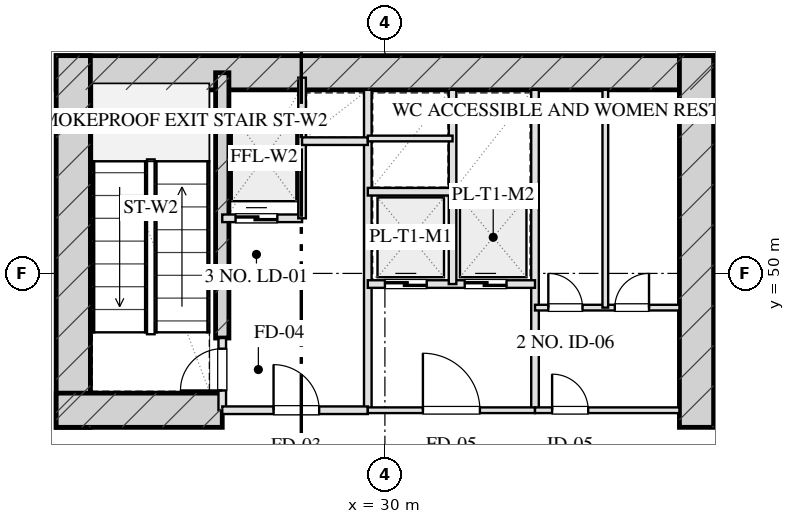
"""IFC4 building model, lengths in metres.
Left out: names, types, materials, properties, quantities, classifications, styles, units other than length and angle.
Written with IfcOpenShell. Run it as: python <this file> out.ifc"""

import sys

from ifc_helpers import new_model, si_unit, direction, frame, frame_2d, origin, place, context, subcontext, project, spatial, rectangle, extrude, element, fill, save


model = new_model("IFC4")
c1 = context("Model", 3, precision=1e-05, world=origin(), true_north=direction((0.0, 1.0)))
c2 = subcontext(c1, "Body", "Model", "MODEL_VIEW")
j1 = project(units=[si_unit("LENGTHUNIT", "METRE"), si_unit("PLANEANGLEUNIT", "RADIAN")], contexts=[c1])
p1 = place(None, origin())
s1 = spatial("IfcSite", under=j1, at=p1, CompositionType="ELEMENT")
p2 = place(p1, origin())
s2 = spatial("IfcBuilding", under=s1, at=p2, CompositionType="ELEMENT")
p3 = place(p2, frame((0.0, 0.0, 6.0)))
s3 = spatial("IfcBuildingStorey", under=s2, at=p3, CompositionType="ELEMENT", Elevation=6.0)
p4 = place(p3, frame((21.35, 55.28, 0.0), z_axis=(0.0, 0.0, 1.0), x_axis=(1.0, 0.0, 0.0)))
e1 = element("IfcWall", 1, at=p4, inside=s3, PredefinedType="SHEAR", context=c2, shape_type="SweptSolid", body=[
    extrude(rectangle(XDim=17.3, YDim=0.9, at=frame_2d((8.65, 0.0))), origin(), (0.0, 0.0, 1.0), 5.5),
])
for number, where, z_axis, x_axis in (
    (2, (21.8, 45.95, 0.0), (0.0, 0.0, 1.0), (0.0, 1.0, 0.0)),
    (3, (38.2, 45.95, 0.0), (0.0, 0.0, 1.0), (0.0, 1.0, 0.0)),
):
    element("IfcWall", number, at=place(p3, frame(where, z_axis=z_axis, x_axis=x_axis)), inside=s3, PredefinedType="SHEAR", context=c2, shape_type="SweptSolid", body=[
        extrude(rectangle(XDim=9.78, YDim=0.9, at=frame_2d((4.89, 0.0))), origin(), (0.0, 0.0, 1.0), 5.5),
    ])
p5 = place(p3, frame((25.72, 48.3, 0.0), z_axis=(0.0, 0.0, 1.0), x_axis=(0.0, 1.0, 0.0)))
e4 = element("IfcWall", 4, at=p5, inside=s3, PredefinedType="SHEAR", context=c2, shape_type="SweptSolid", body=[
    extrude(rectangle(XDim=6.98, YDim=0.35, at=frame_2d((3.49, 0.0))), origin(), (0.0, 0.0, 1.0), 5.5),
])
p6 = place(p3, frame((21.35, 46.4, 0.0), z_axis=(0.0, 0.0, 1.0), x_axis=(1.0, 0.0, 0.0)))
e5 = element("IfcWall", 5, at=p6, inside=s3, PredefinedType="SHEAR", context=c2, shape_type="SweptSolid", body=[
    extrude(rectangle(XDim=4.37, YDim=0.9, at=frame_2d((2.185, 0.0))), origin(), (0.0, 0.0, 1.0), 5.5),
])
p7 = place(p3, frame((25.72, 46.4, 0.0), z_axis=(0.0, 0.0, 1.0), x_axis=(0.0, 1.0, 0.0)))
e6 = element("IfcWall", 6, at=p7, inside=s3, PredefinedType="PARTITIONING", context=c2, shape_type="SweptSolid", body=[
    extrude(rectangle(XDim=1.9, YDim=0.2, at=frame_2d((0.95, 0.0))), origin(), (0.0, 0.0, 1.0), 5.185),
])
p8 = place(p7, frame((0.52, 0.0, 0.0)))
e7 = element("IfcOpeningElement", 7, at=p8, cuts=e6, PredefinedType="OPENING", context=c2, shape_type="SweptSolid", body=[
    extrude(rectangle(XDim=1.1, YDim=2.05, at=frame_2d((0.55, 1.025))), frame((0.0, 0.11, 0.0), z_axis=(0.0, -1.0, 0.0), x_axis=(1.0, 0.0, 0.0)), (0.0, 0.0, 1.0), 0.22),
])
p9 = place(p3, frame((29.55, 46.4, 0.0), z_axis=(0.0, 0.0, 1.0), x_axis=(0.0, 1.0, 0.0)))
e8 = element("IfcWall", 8, at=p9, inside=s3, PredefinedType="PARTITIONING", context=c2, shape_type="SweptSolid", body=[
    extrude(rectangle(XDim=8.43, YDim=0.2, at=frame_2d((4.215, 0.0))), origin(), (0.0, 0.0, 1.0), 5.185),
])
p10 = place(p3, frame((25.72, 46.4, 0.0), z_axis=(0.0, 0.0, 1.0), x_axis=(1.0, 0.0, 0.0)))
e9 = element("IfcWall", 9, at=p10, inside=s3, PredefinedType="PARTITIONING", context=c2, shape_type="SweptSolid", body=[
    extrude(rectangle(XDim=3.83, YDim=0.2, at=frame_2d((1.915, 0.0))), origin(), (0.0, 0.0, 1.0), 5.185),
])
p11 = place(p10, frame((1.35, 0.0, 0.0)))
e10 = element("IfcOpeningElement", 10, at=p11, cuts=e9, PredefinedType="OPENING", context=c2, shape_type="SweptSolid", body=[
    extrude(rectangle(XDim=1.2, YDim=2.05, at=frame_2d((0.6, 1.025))), frame((0.0, 0.11, 0.0), z_axis=(0.0, -1.0, 0.0), x_axis=(1.0, 0.0, 0.0)), (0.0, 0.0, 1.0), 0.22),
])
p12 = place(p3, frame((25.72, 51.45, 0.0), z_axis=(0.0, 0.0, 1.0), x_axis=(1.0, 0.0, 0.0)))
e11 = element("IfcWall", 11, at=p12, inside=s3, PredefinedType="PARTITIONING", context=c2, shape_type="SweptSolid", body=[
    extrude(rectangle(XDim=2.1, YDim=0.2, at=frame_2d((1.05, 0.0))), origin(), (0.0, 0.0, 1.0), 5.185),
])
p13 = place(p12, frame((0.35, 0.0, 0.0)))
e12 = element("IfcOpeningElement", 12, at=p13, cuts=e11, PredefinedType="OPENING", context=c2, shape_type="SweptSolid", body=[
    extrude(rectangle(XDim=1.1, YDim=2.05, at=frame_2d((0.55, 1.025))), frame((0.0, 0.11, 0.0), z_axis=(0.0, -1.0, 0.0), x_axis=(1.0, 0.0, 0.0)), (0.0, 0.0, 1.0), 0.22),
])
p14 = place(p3, frame((27.82, 51.45, 0.0), z_axis=(0.0, 0.0, 1.0), x_axis=(0.0, 1.0, 0.0)))
e13 = element("IfcWall", 13, at=p14, inside=s3, PredefinedType="PARTITIONING", context=c2, shape_type="SweptSolid", body=[
    extrude(rectangle(XDim=3.7, YDim=0.2, at=frame_2d((1.85, 0.0))), origin(), (0.0, 0.0, 1.0), 5.185),
])
p15 = place(p3, frame((27.82, 53.48, 0.0), z_axis=(0.0, 0.0, 1.0), x_axis=(1.0, 0.0, 0.0)))
e14 = element("IfcWall", 14, at=p15, inside=s3, PredefinedType="PARTITIONING", context=c2, shape_type="SweptSolid", body=[
    extrude(rectangle(XDim=1.73, YDim=0.2, at=frame_2d((0.865, 0.0))), origin(), (0.0, 0.0, 1.0), 5.185),
])
p16 = place(p3, frame((33.95, 46.4, 0.0), z_axis=(0.0, 0.0, 1.0), x_axis=(0.0, 1.0, 0.0)))
e15 = element("IfcWall", 15, at=p16, inside=s3, PredefinedType="PARTITIONING", context=c2, shape_type="SweptSolid", body=[
    extrude(rectangle(XDim=8.43, YDim=0.2, at=frame_2d((4.215, 0.0))), origin(), (0.0, 0.0, 1.0), 5.185),
])
p17 = place(p3, frame((29.55, 46.4, 0.0), z_axis=(0.0, 0.0, 1.0), x_axis=(1.0, 0.0, 0.0)))
e16 = element("IfcWall", 16, at=p17, inside=s3, PredefinedType="PARTITIONING", context=c2, shape_type="SweptSolid", body=[
    extrude(rectangle(XDim=4.4, YDim=0.15, at=frame_2d((2.2, 0.0))), origin(), (0.0, 0.0, 1.0), 5.185),
])
p18 = place(p17, frame((1.45, 0.0, 0.0)))
e17 = element("IfcOpeningElement", 17, at=p18, cuts=e16, PredefinedType="OPENING", context=c2, shape_type="SweptSolid", body=[
    extrude(rectangle(XDim=1.5, YDim=2.05, at=frame_2d((0.75, 1.025))), frame((0.0, 0.085, 0.0), z_axis=(0.0, -1.0, 0.0), x_axis=(1.0, 0.0, 0.0)), (0.0, 0.0, 1.0), 0.17),
])
p19 = place(p3, frame((29.55, 49.72, 0.0), z_axis=(0.0, 0.0, 1.0), x_axis=(1.0, 0.0, 0.0)))
e18 = element("IfcWall", 18, at=p19, inside=s3, PredefinedType="PARTITIONING", context=c2, shape_type="SweptSolid", body=[
    extrude(rectangle(XDim=4.4, YDim=0.2, at=frame_2d((2.2, 0.0))), origin(), (0.0, 0.0, 1.0), 5.185),
])
p20 = place(p19, frame((0.45, 0.0, 0.0)))
e19 = element("IfcOpeningElement", 19, at=p20, cuts=e18, PredefinedType="OPENING", context=c2, shape_type="SweptSolid", body=[
    extrude(rectangle(XDim=1.1, YDim=2.05, at=frame_2d((0.55, 1.025))), frame((0.0, 0.11, 0.0), z_axis=(0.0, -1.0, 0.0), x_axis=(1.0, 0.0, 0.0)), (0.0, 0.0, 1.0), 0.22),
])
p21 = place(p19, frame((2.55, 0.0, 0.0)))
e20 = element("IfcOpeningElement", 20, at=p21, cuts=e18, PredefinedType="OPENING", context=c2, shape_type="SweptSolid", body=[
    extrude(rectangle(XDim=1.1, YDim=2.05, at=frame_2d((0.55, 1.025))), frame((0.0, 0.11, 0.0), z_axis=(0.0, -1.0, 0.0), x_axis=(1.0, 0.0, 0.0)), (0.0, 0.0, 1.0), 0.22),
])
p22 = place(p3, frame((31.78, 49.72, 0.0), z_axis=(0.0, 0.0, 1.0), x_axis=(0.0, 1.0, 0.0)))
e21 = element("IfcWall", 21, at=p22, inside=s3, PredefinedType="PARTITIONING", context=c2, shape_type="SweptSolid", body=[
    extrude(rectangle(XDim=5.11, YDim=0.2, at=frame_2d((2.555, 0.0))), origin(), (0.0, 0.0, 1.0), 5.185),
])
p23 = place(p3, frame((29.55, 52.15, 0.0), z_axis=(0.0, 0.0, 1.0), x_axis=(1.0, 0.0, 0.0)))
e22 = element("IfcWall", 22, at=p23, inside=s3, PredefinedType="PARTITIONING", context=c2, shape_type="SweptSolid", body=[
    extrude(rectangle(XDim=4.4, YDim=0.2, at=frame_2d((2.2, 0.0))), origin(), (0.0, 0.0, 1.0), 5.185),
])
p24 = place(p3, frame((29.55, 53.55, 0.0), z_axis=(0.0, 0.0, 1.0), x_axis=(1.0, 0.0, 0.0)))
e23 = element("IfcWall", 23, at=p24, inside=s3, PredefinedType="PARTITIONING", context=c2, shape_type="SweptSolid", body=[
    extrude(rectangle(XDim=2.23, YDim=0.15, at=frame_2d((1.115, 0.0))), origin(), (0.0, 0.0, 1.0), 5.185),
])
p25 = place(p3, frame((33.95, 46.4, 0.0), z_axis=(0.0, 0.0, 1.0), x_axis=(1.0, 0.0, 0.0)))
e24 = element("IfcWall", 24, at=p25, inside=s3, PredefinedType="PARTITIONING", context=c2, shape_type="SweptSolid", body=[
    extrude(rectangle(XDim=3.8, YDim=0.15, at=frame_2d((1.9, 0.0))), origin(), (0.0, 0.0, 1.0), 5.185),
])
p26 = place(p25, frame((0.45, 0.0, 0.0)))
e25 = element("IfcOpeningElement", 25, at=p26, cuts=e24, PredefinedType="OPENING", context=c2, shape_type="SweptSolid", body=[
    extrude(rectangle(XDim=0.95, YDim=2.05, at=frame_2d((0.475, 1.025))), frame((0.0, 0.085, 0.0), z_axis=(0.0, -1.0, 0.0), x_axis=(1.0, 0.0, 0.0)), (0.0, 0.0, 1.0), 0.17),
])
p27 = place(p3, frame((33.95, 49.1, 0.0), z_axis=(0.0, 0.0, 1.0), x_axis=(1.0, 0.0, 0.0)))
e26 = element("IfcWall", 26, at=p27, inside=s3, PredefinedType="PARTITIONING", context=c2, shape_type="SweptSolid", body=[
    extrude(rectangle(XDim=3.8, YDim=0.15, at=frame_2d((1.9, 0.0))), origin(), (0.0, 0.0, 1.0), 5.185),
])
p28 = place(p27, frame((0.35, 0.0, 0.0)))
e27 = element("IfcOpeningElement", 27, at=p28, cuts=e26, PredefinedType="OPENING", context=c2, shape_type="SweptSolid", body=[
    extrude(rectangle(XDim=0.9, YDim=2.05, at=frame_2d((0.45, 1.025))), frame((0.0, 0.085, 0.0), z_axis=(0.0, -1.0, 0.0), x_axis=(1.0, 0.0, 0.0)), (0.0, 0.0, 1.0), 0.17),
])
p29 = place(p27, frame((2.1, 0.0, 0.0)))
e28 = element("IfcOpeningElement", 28, at=p29, cuts=e26, PredefinedType="OPENING", context=c2, shape_type="SweptSolid", body=[
    extrude(rectangle(XDim=0.9, YDim=2.05, at=frame_2d((0.45, 1.025))), frame((0.0, 0.085, 0.0), z_axis=(0.0, -1.0, 0.0), x_axis=(1.0, 0.0, 0.0)), (0.0, 0.0, 1.0), 0.17),
])
p30 = place(p3, frame((35.8, 49.1, 0.0), z_axis=(0.0, 0.0, 1.0), x_axis=(0.0, 1.0, 0.0)))
e29 = element("IfcWall", 29, at=p30, inside=s3, PredefinedType="PARTITIONING", context=c2, shape_type="SweptSolid", body=[
    extrude(rectangle(XDim=5.73, YDim=0.15, at=frame_2d((2.865, 0.0))), origin(), (0.0, 0.0, 1.0), 5.185),
])
p31 = place(p8, origin())
e30 = element("IfcDoor", 30, at=p31, inside=s3, OperationType="SINGLE_SWING_LEFT", PredefinedType="DOOR", context=c2, shape_type="SweptSolid", body=[
    extrude(rectangle(XDim=1.1, YDim=2.05, at=frame_2d((0.55, 1.025))), frame((0.0, 0.025, 0.0), z_axis=(0.0, -1.0, 0.0), x_axis=(1.0, 0.0, 0.0)), (0.0, 0.0, 1.0), 0.05),
])
fill(e7, e30)
p32 = place(p11, origin())
e31 = element("IfcDoor", 31, at=p32, inside=s3, OperationType="SINGLE_SWING_LEFT", PredefinedType="DOOR", context=c2, shape_type="SweptSolid", body=[
    extrude(rectangle(XDim=1.2, YDim=2.05, at=frame_2d((0.6, 1.025))), frame((0.0, 0.025, 0.0), z_axis=(0.0, -1.0, 0.0), x_axis=(1.0, 0.0, 0.0)), (0.0, 0.0, 1.0), 0.05),
])
fill(e10, e31)
p33 = place(p13, origin())
e32 = element("IfcDoor", 32, at=p33, inside=s3, OperationType="DOUBLE_DOOR_SLIDING", PredefinedType="DOOR", context=c2, shape_type="SweptSolid", body=[
    extrude(rectangle(XDim=1.1, YDim=2.05, at=frame_2d((0.55, 1.025))), frame((0.0, 0.025, 0.0), z_axis=(0.0, -1.0, 0.0), x_axis=(1.0, 0.0, 0.0)), (0.0, 0.0, 1.0), 0.05),
])
fill(e12, e32)
p34 = place(p18, origin())
e33 = element("IfcDoor", 33, at=p34, inside=s3, OperationType="SINGLE_SWING_LEFT", PredefinedType="DOOR", context=c2, shape_type="SweptSolid", body=[
    extrude(rectangle(XDim=1.5, YDim=2.05, at=frame_2d((0.75, 1.025))), frame((0.0, 0.025, 0.0), z_axis=(0.0, -1.0, 0.0), x_axis=(1.0, 0.0, 0.0)), (0.0, 0.0, 1.0), 0.05),
])
fill(e17, e33)
p35 = place(p20, origin())
e34 = element("IfcDoor", 34, at=p35, inside=s3, OperationType="DOUBLE_DOOR_SLIDING", PredefinedType="DOOR", context=c2, shape_type="SweptSolid", body=[
    extrude(rectangle(XDim=1.1, YDim=2.05, at=frame_2d((0.55, 1.025))), frame((0.0, 0.025, 0.0), z_axis=(0.0, -1.0, 0.0), x_axis=(1.0, 0.0, 0.0)), (0.0, 0.0, 1.0), 0.05),
])
fill(e19, e34)
p36 = place(p21, origin())
e35 = element("IfcDoor", 35, at=p36, inside=s3, OperationType="DOUBLE_DOOR_SLIDING", PredefinedType="DOOR", context=c2, shape_type="SweptSolid", body=[
    extrude(rectangle(XDim=1.1, YDim=2.05, at=frame_2d((0.55, 1.025))), frame((0.0, 0.025, 0.0), z_axis=(0.0, -1.0, 0.0), x_axis=(1.0, 0.0, 0.0)), (0.0, 0.0, 1.0), 0.05),
])
fill(e20, e35)
p37 = place(p26, origin())
e36 = element("IfcDoor", 36, at=p37, inside=s3, OperationType="SINGLE_SWING_LEFT", PredefinedType="DOOR", context=c2, shape_type="SweptSolid", body=[
    extrude(rectangle(XDim=0.95, YDim=2.05, at=frame_2d((0.475, 1.025))), frame((0.0, 0.025, 0.0), z_axis=(0.0, -1.0, 0.0), x_axis=(1.0, 0.0, 0.0)), (0.0, 0.0, 1.0), 0.05),
])
fill(e25, e36)
p38 = place(p28, origin())
e37 = element("IfcDoor", 37, at=p38, inside=s3, OperationType="SINGLE_SWING_LEFT", PredefinedType="DOOR", context=c2, shape_type="SweptSolid", body=[
    extrude(rectangle(XDim=0.9, YDim=2.05, at=frame_2d((0.45, 1.025))), frame((0.0, 0.025, 0.0), z_axis=(0.0, -1.0, 0.0), x_axis=(1.0, 0.0, 0.0)), (0.0, 0.0, 1.0), 0.05),
])
fill(e27, e37)
p39 = place(p29, origin())
e38 = element("IfcDoor", 38, at=p39, inside=s3, OperationType="SINGLE_SWING_RIGHT", PredefinedType="DOOR", context=c2, shape_type="SweptSolid", body=[
    extrude(rectangle(XDim=0.9, YDim=2.05, at=frame_2d((0.45, 1.025))), frame((0.0, 0.025, 0.0), z_axis=(0.0, -1.0, 0.0), x_axis=(1.0, 0.0, 0.0)), (0.0, 0.0, 1.0), 0.05),
])
fill(e28, e38)
save(model, sys.argv[1])
